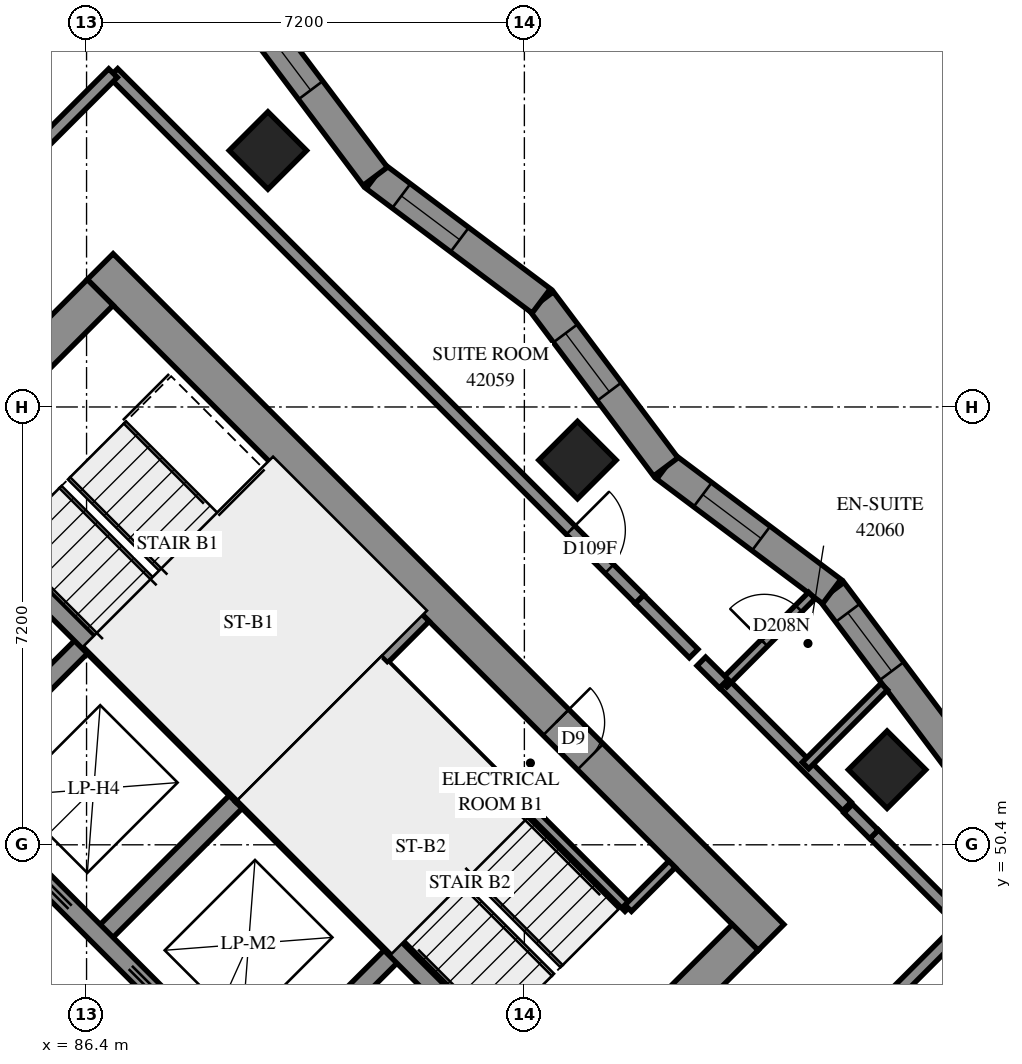
"""IFC4 building model, lengths in metres.
Left out: names, types, materials, properties, quantities, classifications, styles, units other than length and angle.
Written with IfcOpenShell. Run it as: python <this file> out.ifc"""

import sys

from ifc_helpers import new_model, si_unit, direction, frame, frame_2d, origin, origin_2d, place, context, subcontext, project, spatial, polyline, rectangle, outline, extrude, element, fill, save


model = new_model("IFC4")
c1 = context("Model", 3, precision=1e-05, world=origin(), true_north=direction((0.0, 1.0)))
c2 = subcontext(c1, "Body", "Model", "MODEL_VIEW")
j1 = project(units=[si_unit("LENGTHUNIT", "METRE"), si_unit("PLANEANGLEUNIT", "RADIAN")], contexts=[c1])
p1 = place(None, origin())
s1 = spatial("IfcSite", under=j1, at=p1, CompositionType="ELEMENT")
p2 = place(p1, origin())
s2 = spatial("IfcBuilding", under=s1, at=p2, CompositionType="ELEMENT")
p3 = place(p2, frame((0.0, 0.0, 155.8)))
s3 = spatial("IfcBuildingStorey", under=s2, at=p3, CompositionType="ELEMENT", Elevation=155.8)
for number, where, z_axis, x_axis in (
    (1, (89.382, 61.818, 0.0), (0.0, 0.0, 1.0), (0.707, -0.707, 0.0)),
    (2, (94.474, 56.727, 0.0), (0.0, 0.0, 1.0), (0.707, -0.707, 0.0)),
    (3, (99.565, 51.635, 0.0), (0.0, 0.0, 1.0), (0.707, -0.707, 0.0)),
):
    element("IfcColumn", number, at=place(p3, frame(where, z_axis=z_axis, x_axis=x_axis)), inside=s3, PredefinedType="COLUMN", context=c2, shape_type="SweptSolid", body=[
        extrude(rectangle(XDim=0.9, YDim=0.9, at=origin_2d()), origin(), (0.0, 0.0, 1.0), 3.1),
    ])
p4 = place(p3, frame((76.018, 49.302, -0.3), z_axis=(0.0, 0.0, 1.0), x_axis=(0.7071067812, -0.7071067812, 0.0)))
e4 = element("IfcWall", 4, at=p4, inside=s3, PredefinedType="SHEAR", context=c2, shape_type="SweptSolid", body=[
    extrude(rectangle(XDim=15.6, YDim=0.6, at=frame_2d((7.8, 0.0))), origin(), (0.0, 0.0, 1.0), 2.7),
])
p5 = place(p3, frame((86.625, 59.908, -0.3), z_axis=(0.0, 0.0, 1.0), x_axis=(0.7071067812, -0.7071067812, 0.0)))
e5 = element("IfcWall", 5, at=p5, inside=s3, PredefinedType="SHEAR", context=c2, shape_type="SweptSolid", body=[
    extrude(rectangle(XDim=15.6, YDim=0.6, at=frame_2d((7.8, 0.0))), origin(), (0.0, 0.0, 1.0), 2.7),
])
p6 = place(p5, frame((10.6, 0.0, 0.3)))
e6 = element("IfcOpeningElement", 6, at=p6, cuts=e5, PredefinedType="OPENING", context=c2, shape_type="SweptSolid", body=[
    extrude(rectangle(XDim=0.8, YDim=2.1, at=frame_2d((0.4, 1.05))), frame((0.0, 0.31, 0.0), z_axis=(0.0, -1.0, 0.0), x_axis=(1.0, 0.0, 0.0)), (0.0, 0.0, 1.0), 0.62),
])
p7 = place(p3, frame((76.442, 49.302, -0.3), z_axis=(0.0, 0.0, 1.0), x_axis=(0.7071067812, 0.7071067812, 0.0)))
e7 = element("IfcWall", 7, at=p7, inside=s3, PredefinedType="SHEAR", context=c2, shape_type="SweptSolid", body=[
    extrude(rectangle(XDim=14.4, YDim=0.6, at=frame_2d((7.2, 0.0))), origin(), (0.0, 0.0, 1.0), 2.7),
])
p8 = place(p7, frame((4.55, 0.0, 0.3)))
e8 = element("IfcOpeningElement", 8, at=p8, cuts=e7, PredefinedType="OPENING", context=c2, shape_type="SweptSolid", body=[
    extrude(rectangle(XDim=1.1, YDim=2.1, at=frame_2d((0.55, 1.05))), frame((0.0, 0.31, 0.0), z_axis=(0.0, -1.0, 0.0), x_axis=(1.0, 0.0, 0.0)), (0.0, 0.0, 1.0), 0.62),
])
p9 = place(p7, frame((11.35, 0.0, 0.3)))
e9 = element("IfcOpeningElement", 9, at=p9, cuts=e7, PredefinedType="OPENING", context=c2, shape_type="SweptSolid", body=[
    extrude(rectangle(XDim=1.1, YDim=2.1, at=frame_2d((0.55, 1.05))), frame((0.0, 0.31, 0.0), z_axis=(0.0, -1.0, 0.0), x_axis=(1.0, 0.0, 0.0)), (0.0, 0.0, 1.0), 0.62),
])
p10 = place(p3, frame((87.049, 38.695, -0.3), z_axis=(0.0, 0.0, 1.0), x_axis=(0.7071067812, 0.7071067812, 0.0)))
e10 = element("IfcWall", 10, at=p10, inside=s3, PredefinedType="SHEAR", context=c2, shape_type="SweptSolid", body=[
    extrude(rectangle(XDim=14.4, YDim=0.6, at=frame_2d((7.2, 0.0))), origin(), (0.0, 0.0, 1.0), 2.7),
])
p11 = place(p10, frame((4.55, 0.0, 0.3)))
e11 = element("IfcOpeningElement", 11, at=p11, cuts=e10, PredefinedType="OPENING", context=c2, shape_type="SweptSolid", body=[
    extrude(rectangle(XDim=1.1, YDim=2.1, at=frame_2d((0.55, 1.05))), frame((0.0, 0.31, 0.0), z_axis=(0.0, -1.0, 0.0), x_axis=(1.0, 0.0, 0.0)), (0.0, 0.0, 1.0), 0.62),
])
p12 = place(p10, frame((11.35, 0.0, 0.3)))
e12 = element("IfcOpeningElement", 12, at=p12, cuts=e10, PredefinedType="OPENING", context=c2, shape_type="SweptSolid", body=[
    extrude(rectangle(XDim=1.1, YDim=2.1, at=frame_2d((0.55, 1.05))), frame((0.0, 0.31, 0.0), z_axis=(0.0, -1.0, 0.0), x_axis=(1.0, 0.0, 0.0)), (0.0, 0.0, 1.0), 0.62),
])
p13 = place(p3, frame((84.079, 51.423, 0.0), z_axis=(0.0, 0.0, 1.0), x_axis=(0.7071219326, 0.7070916295, 0.0)))
e13 = element("IfcWall", 13, at=p13, inside=s3, PredefinedType="SOLIDWALL", context=c2, shape_type="SweptSolid", body=[
    extrude(rectangle(XDim=3.3, YDim=0.3, at=frame_2d((1.65, 0.0))), origin(), (0.0, 0.0, 1.0), 3.1),
])
for number, where, z_axis, x_axis in (
    (14, (86.625, 48.878, 0.0), (0.0, 0.0, 1.0), (0.707, 0.707, 0.0)),
    (15, (89.17, 46.332, 0.0), (0.0, 0.0, 1.0), (0.707, 0.707, 0.0)),
):
    element("IfcWall", number, at=place(p3, frame(where, z_axis=z_axis, x_axis=x_axis)), inside=s3, PredefinedType="SOLIDWALL", context=c2, shape_type="SweptSolid", body=[
        extrude(rectangle(XDim=3.3, YDim=0.3, at=frame_2d((1.65, 0.0))), origin(), (0.0, 0.0, 1.0), 3.1),
    ])
p14 = place(p3, frame((78.988, 51.423, 0.0), z_axis=(0.0, 0.0, 1.0), x_axis=(0.7071067812, -0.7071067812, 0.0)))
e16 = element("IfcWall", 16, at=p14, inside=s3, PredefinedType="SOLIDWALL", context=c2, shape_type="SweptSolid", body=[
    extrude(rectangle(XDim=14.4, YDim=0.3, at=frame_2d((7.2, 0.0))), origin(), (0.0, 0.0, 1.0), 3.1),
])
p15 = place(p14, frame((1.35, 0.0, 0.0)))
e17 = element("IfcOpeningElement", 17, at=p15, cuts=e16, PredefinedType="OPENING", context=c2, shape_type="SweptSolid", body=[
    extrude(rectangle(XDim=0.9, YDim=2.1, at=frame_2d((0.45, 1.05))), frame((0.0, 0.16, 0.0), z_axis=(0.0, -1.0, 0.0), x_axis=(1.0, 0.0, 0.0)), (0.0, 0.0, 1.0), 0.32),
])
p16 = place(p14, frame((4.95, 0.0, 0.0)))
e18 = element("IfcOpeningElement", 18, at=p16, cuts=e16, PredefinedType="OPENING", context=c2, shape_type="SweptSolid", body=[
    extrude(rectangle(XDim=0.9, YDim=2.1, at=frame_2d((0.45, 1.05))), frame((0.0, 0.16, 0.0), z_axis=(0.0, -1.0, 0.0), x_axis=(1.0, 0.0, 0.0)), (0.0, 0.0, 1.0), 0.32),
])
p17 = place(p14, frame((8.55, 0.0, 0.0)))
e19 = element("IfcOpeningElement", 19, at=p17, cuts=e16, PredefinedType="OPENING", context=c2, shape_type="SweptSolid", body=[
    extrude(rectangle(XDim=0.9, YDim=2.1, at=frame_2d((0.45, 1.05))), frame((0.0, 0.16, 0.0), z_axis=(0.0, -1.0, 0.0), x_axis=(1.0, 0.0, 0.0)), (0.0, 0.0, 1.0), 0.32),
])
p18 = place(p14, frame((12.05, 0.0, 0.0)))
e20 = element("IfcOpeningElement", 20, at=p18, cuts=e16, PredefinedType="OPENING", context=c2, shape_type="SweptSolid", body=[
    extrude(rectangle(XDim=1.1, YDim=2.1, at=frame_2d((0.55, 1.05))), frame((0.0, 0.16, 0.0), z_axis=(0.0, -1.0, 0.0), x_axis=(1.0, 0.0, 0.0)), (0.0, 0.0, 1.0), 0.32),
])
p19 = place(p3, frame((81.534, 53.969, 0.0), z_axis=(0.0, 0.0, 1.0), x_axis=(0.707103309, -0.7071102534, 0.0)))
e21 = element("IfcWall", 21, at=p19, inside=s3, PredefinedType="SOLIDWALL", context=c2, shape_type="SweptSolid", body=[
    extrude(rectangle(XDim=14.4, YDim=0.3, at=frame_2d((7.2, 0.0))), origin(), (0.0, 0.0, 1.0), 3.1),
])
p20 = place(p19, frame((1.25, 0.0, 0.0)))
e22 = element("IfcOpeningElement", 22, at=p20, cuts=e21, PredefinedType="OPENING", context=c2, shape_type="SweptSolid", body=[
    extrude(rectangle(XDim=1.1, YDim=2.1, at=frame_2d((0.55, 1.05))), frame((0.0, 0.16, 0.0), z_axis=(0.0, -1.0, 0.0), x_axis=(1.0, 0.0, 0.0)), (0.0, 0.0, 1.0), 0.32),
])
p21 = place(p19, frame((4.85, 0.0, 0.0)))
e23 = element("IfcOpeningElement", 23, at=p21, cuts=e21, PredefinedType="OPENING", context=c2, shape_type="SweptSolid", body=[
    extrude(rectangle(XDim=1.1, YDim=2.1, at=frame_2d((0.55, 1.05))), frame((0.0, 0.16, 0.0), z_axis=(0.0, -1.0, 0.0), x_axis=(1.0, 0.0, 0.0)), (0.0, 0.0, 1.0), 0.32),
])
p22 = place(p19, frame((8.45, 0.0, 0.0)))
e24 = element("IfcOpeningElement", 24, at=p22, cuts=e21, PredefinedType="OPENING", context=c2, shape_type="SweptSolid", body=[
    extrude(rectangle(XDim=1.1, YDim=2.1, at=frame_2d((0.55, 1.05))), frame((0.0, 0.16, 0.0), z_axis=(0.0, -1.0, 0.0), x_axis=(1.0, 0.0, 0.0)), (0.0, 0.0, 1.0), 0.32),
])
p23 = place(p19, frame((12.05, 0.0, 0.0)))
e25 = element("IfcOpeningElement", 25, at=p23, cuts=e21, PredefinedType="OPENING", context=c2, shape_type="SweptSolid", body=[
    extrude(rectangle(XDim=1.1, YDim=2.1, at=frame_2d((0.55, 1.05))), frame((0.0, 0.16, 0.0), z_axis=(0.0, -1.0, 0.0), x_axis=(1.0, 0.0, 0.0)), (0.0, 0.0, 1.0), 0.32),
])
for number, where, z_axis, x_axis in (
    (26, (83.867, 56.302, 0.0), (0.0, 0.0, 1.0), (0.707, -0.707, 0.0)),
    (27, (88.958, 51.211, 0.0), (0.0, 0.0, 1.0), (0.707, -0.707, 0.0)),
):
    element("IfcWall", number, at=place(p3, frame(where, z_axis=z_axis, x_axis=x_axis)), inside=s3, PredefinedType="SOLIDWALL", context=c2, shape_type="SweptSolid", body=[
        extrude(rectangle(XDim=7.2, YDim=0.3, at=frame_2d((3.6, 0.0))), origin(), (0.0, 0.0, 1.0), 3.1),
    ])
p24 = place(p3, frame((88.958, 51.211, 0.0), z_axis=(0.0, 0.0, 1.0), x_axis=(0.7071067812, 0.7071067812, 0.0)))
e28 = element("IfcWall", 28, at=p24, inside=s3, PredefinedType="SOLIDWALL", context=c2, shape_type="SweptSolid", body=[
    extrude(rectangle(XDim=4.2, YDim=0.3, at=frame_2d((2.1, 0.0))), origin(), (0.0, 0.0, 1.0), 3.1),
])
p25 = place(p3, frame((100.704, 51.836, 0.0), z_axis=(0.0, 0.0, 1.0), x_axis=(-0.600150005, 0.7998874743, 0.0)))
e29 = element("IfcWall", 29, at=p25, inside=s3, PredefinedType="SOLIDWALL", context=c2, shape_type="SweptSolid", body=[
    extrude(outline(polyline([(0.036, -0.25), (3.449, -0.25), (3.377, 0.25), (-0.036, 0.25), (0.036, -0.25)])), origin(), (0.0, 0.0, 1.0), 3.1),
])
p26 = place(p25, frame((1.774, 0.0, 0.45)))
e30 = element("IfcOpeningElement", 30, at=p26, cuts=e29, PredefinedType="OPENING", context=c2, shape_type="SweptSolid", body=[
    extrude(rectangle(XDim=1.2, YDim=2.5, at=frame_2d((0.6, 1.25))), frame((0.0, 0.26, 0.0), z_axis=(0.0, -1.0, 0.0), x_axis=(1.0, 0.0, 0.0)), (0.0, 0.0, 1.0), 0.52),
])
p27 = place(p3, frame((98.656, 54.566, 0.0), z_axis=(0.0, 0.0, 1.0), x_axis=(-0.7998874743, 0.600150005, 0.0)))
e31 = element("IfcWall", 31, at=p27, inside=s3, PredefinedType="SOLIDWALL", context=c2, shape_type="SweptSolid", body=[
    extrude(outline(polyline([(-0.036, -0.25), (3.377, -0.25), (3.449, 0.25), (0.036, 0.25), (-0.036, -0.25)])), origin(), (0.0, 0.0, 1.0), 3.1),
])
p28 = place(p27, frame((1.453, 0.0, 0.45)))
e32 = element("IfcOpeningElement", 32, at=p28, cuts=e31, PredefinedType="OPENING", context=c2, shape_type="SweptSolid", body=[
    extrude(rectangle(XDim=1.2, YDim=2.5, at=frame_2d((0.6, 1.25))), frame((0.0, 0.26, 0.0), z_axis=(0.0, -1.0, 0.0), x_axis=(1.0, 0.0, 0.0)), (0.0, 0.0, 1.0), 0.52),
])
p29 = place(p3, frame((95.926, 56.614, 0.0), z_axis=(0.0, 0.0, 1.0), x_axis=(-0.600150005, 0.7998874743, 0.0)))
e33 = element("IfcWall", 33, at=p29, inside=s3, PredefinedType="SOLIDWALL", context=c2, shape_type="SweptSolid", body=[
    extrude(outline(polyline([(0.036, -0.25), (3.449, -0.25), (3.377, 0.25), (-0.036, 0.25), (0.036, -0.25)])), origin(), (0.0, 0.0, 1.0), 3.1),
])
p30 = place(p29, frame((1.547, 0.0, 0.45)))
e34 = element("IfcOpeningElement", 34, at=p30, cuts=e33, PredefinedType="OPENING", context=c2, shape_type="SweptSolid", body=[
    extrude(rectangle(XDim=1.2, YDim=2.5, at=frame_2d((0.6, 1.25))), frame((0.0, 0.26, 0.0), z_axis=(0.0, -1.0, 0.0), x_axis=(1.0, 0.0, 0.0)), (0.0, 0.0, 1.0), 0.52),
])
p31 = place(p3, frame((93.877, 59.344, 0.0), z_axis=(0.0, 0.0, 1.0), x_axis=(-0.7998874743, 0.600150005, 0.0)))
e35 = element("IfcWall", 35, at=p31, inside=s3, PredefinedType="SOLIDWALL", context=c2, shape_type="SweptSolid", body=[
    extrude(outline(polyline([(-0.036, -0.25), (3.377, -0.25), (3.449, 0.25), (0.036, 0.25), (-0.036, -0.25)])), origin(), (0.0, 0.0, 1.0), 3.1),
])
p32 = place(p31, frame((1.677, 0.0, 0.45)))
e36 = element("IfcOpeningElement", 36, at=p32, cuts=e35, PredefinedType="OPENING", context=c2, shape_type="SweptSolid", body=[
    extrude(rectangle(XDim=1.2, YDim=2.5, at=frame_2d((0.6, 1.25))), frame((0.0, 0.26, 0.0), z_axis=(0.0, -1.0, 0.0), x_axis=(1.0, 0.0, 0.0)), (0.0, 0.0, 1.0), 0.52),
])
p33 = place(p3, frame((91.147, 61.393, 0.0), z_axis=(0.0, 0.0, 1.0), x_axis=(-0.600150005, 0.7998874743, 0.0)))
e37 = element("IfcWall", 37, at=p33, inside=s3, PredefinedType="SOLIDWALL", context=c2, shape_type="SweptSolid", body=[
    extrude(outline(polyline([(0.036, -0.25), (3.449, -0.25), (3.377, 0.25), (-0.036, 0.25), (0.036, -0.25)])), origin(), (0.0, 0.0, 1.0), 3.1),
])
p34 = place(p33, frame((1.771, 0.0, 0.45)))
e38 = element("IfcOpeningElement", 38, at=p34, cuts=e37, PredefinedType="OPENING", context=c2, shape_type="SweptSolid", body=[
    extrude(rectangle(XDim=1.2, YDim=2.5, at=frame_2d((0.6, 1.25))), frame((0.0, 0.26, 0.0), z_axis=(0.0, -1.0, 0.0), x_axis=(1.0, 0.0, 0.0)), (0.0, 0.0, 1.0), 0.52),
])
p35 = place(p3, frame((91.313, 53.354, 0.0), z_axis=(0.0, 0.0, 1.0), x_axis=(0.7071067812, -0.7071067812, 0.0)))
e39 = element("IfcWall", 39, at=p35, inside=s3, PredefinedType="PARTITIONING", context=c2, shape_type="SweptSolid", body=[
    extrude(rectangle(XDim=5.65, YDim=0.15, at=frame_2d((2.825, 0.0))), origin(), (0.0, 0.0, 1.0), 3.1),
])
p36 = place(p3, frame((95.308, 49.358, 0.0), z_axis=(0.0, 0.0, 1.0), x_axis=(0.70705776, 0.707155799, 0.0)))
e40 = element("IfcWall", 40, at=p36, inside=s3, PredefinedType="PARTITIONING", context=c2, shape_type="SweptSolid", body=[
    extrude(rectangle(XDim=1.02, YDim=0.15, at=frame_2d((0.51, 0.0))), origin(), (0.0, 0.0, 1.0), 3.1),
])
p37 = place(p3, frame((86.841, 63.093, 0.0), z_axis=(0.0, 0.0, 1.0), x_axis=(0.7071067812, -0.7071067812, 0.0)))
e41 = element("IfcWall", 41, at=p37, inside=s3, PredefinedType="PARTITIONING", context=c2, shape_type="SweptSolid", body=[
    extrude(rectangle(XDim=12.239, YDim=0.2, at=frame_2d((6.119, 0.0))), origin(), (0.0, 0.0, 1.0), 3.1),
])
p38 = place(p37, frame((10.634, 0.0, 0.0)))
e42 = element("IfcOpeningElement", 42, at=p38, cuts=e41, PredefinedType="OPENING", context=c2, shape_type="SweptSolid", body=[
    extrude(rectangle(XDim=0.9, YDim=2.1, at=frame_2d((0.45, 1.05))), frame((0.0, 0.11, 0.0), z_axis=(0.0, -1.0, 0.0), x_axis=(1.0, 0.0, 0.0)), (0.0, 0.0, 1.0), 0.22),
])
p39 = place(p3, frame((94.401, 41.383, 0.0), z_axis=(0.0, 0.0, 1.0), x_axis=(0.7071067812, 0.7071067812, 0.0)))
e43 = element("IfcWall", 43, at=p39, inside=s3, PredefinedType="PARTITIONING", context=c2, shape_type="SweptSolid", body=[
    extrude(rectangle(XDim=12.014, YDim=0.2, at=frame_2d((6.007, 0.0))), origin(), (0.0, 0.0, 1.0), 3.1),
])
p40 = place(p3, frame((93.767, 42.021, 0.0), z_axis=(0.0, 0.0, 1.0), x_axis=(0.7071067812, 0.7071067812, 0.0)))
e44 = element("IfcWall", 44, at=p40, inside=s3, PredefinedType="PARTITIONING", context=c2, shape_type="SweptSolid", body=[
    extrude(rectangle(XDim=9.998, YDim=0.2, at=frame_2d((4.999, 0.0))), origin(), (0.0, 0.0, 1.0), 3.1),
])
p41 = place(p40, frame((0.196, 0.0, 0.0)))
e45 = element("IfcOpeningElement", 45, at=p41, cuts=e44, PredefinedType="OPENING", context=c2, shape_type="SweptSolid", body=[
    extrude(rectangle(XDim=1.0, YDim=2.1, at=frame_2d((0.5, 1.05))), frame((0.0, 0.11, 0.0), z_axis=(0.0, -1.0, 0.0), x_axis=(1.0, 0.0, 0.0)), (0.0, 0.0, 1.0), 0.22),
])
p42 = place(p3, frame((79.799, 56.055, 0.0), z_axis=(0.0, 0.0, 1.0), x_axis=(0.7071067812, 0.7071067812, 0.0)))
e46 = element("IfcWall", 46, at=p42, inside=s3, PredefinedType="PARTITIONING", context=c2, shape_type="SweptSolid", body=[
    extrude(rectangle(XDim=9.95, YDim=0.2, at=frame_2d((4.975, 0.0))), origin(), (0.0, 0.0, 1.0), 3.1),
])
p43 = place(p42, frame((1.071, 0.0, 0.0)))
e47 = element("IfcOpeningElement", 47, at=p43, cuts=e46, PredefinedType="OPENING", context=c2, shape_type="SweptSolid", body=[
    extrude(rectangle(XDim=1.0, YDim=2.1, at=frame_2d((0.5, 1.05))), frame((0.0, 0.11, 0.0), z_axis=(0.0, -1.0, 0.0), x_axis=(1.0, 0.0, 0.0)), (0.0, 0.0, 1.0), 0.22),
])
p44 = place(p3, frame((96.882, 53.053, 0.0), z_axis=(0.0, 0.0, 1.0), x_axis=(0.7071067812, -0.7071067812, 0.0)))
e48 = element("IfcWall", 48, at=p44, inside=s3, PredefinedType="PARTITIONING", context=c2, shape_type="SweptSolid", body=[
    extrude(rectangle(XDim=2.86, YDim=0.2, at=frame_2d((1.43, 0.0))), origin(), (0.0, 0.0, 1.0), 3.1),
])
p45 = place(p3, frame((99.352, 50.574, 0.0), z_axis=(0.0, 0.0, 1.0), x_axis=(0.7075827869, -0.7066304548, 0.0)))
e49 = element("IfcWall", 49, at=p45, inside=s3, PredefinedType="PARTITIONING", context=c2, shape_type="SweptSolid", body=[
    extrude(rectangle(XDim=2.1, YDim=0.2, at=frame_2d((1.05, 0.0))), origin(), (0.0, 0.0, 1.0), 3.1),
])
p46 = place(p3, frame((96.877, 53.051, 0.0), z_axis=(0.0, 0.0, 1.0), x_axis=(0.707131173, 0.7070823885, 0.0)))
e50 = element("IfcWall", 50, at=p46, inside=s3, PredefinedType="PARTITIONING", context=c2, shape_type="SweptSolid", body=[
    extrude(rectangle(XDim=2.05, YDim=0.15, at=frame_2d((1.025, 0.0))), origin(), (0.0, 0.0, 1.0), 3.1),
])
p47 = place(p46, frame((0.946, 0.0, 0.0)))
e51 = element("IfcOpeningElement", 51, at=p47, cuts=e50, PredefinedType="OPENING", context=c2, shape_type="SweptSolid", body=[
    extrude(rectangle(XDim=0.8, YDim=2.1, at=frame_2d((0.4, 1.05))), frame((0.0, 0.085, 0.0), z_axis=(0.0, -1.0, 0.0), x_axis=(1.0, 0.0, 0.0)), (0.0, 0.0, 1.0), 0.17),
])
p48 = place(p3, frame((98.224, 51.704, 0.0), z_axis=(0.0, 0.0, 1.0), x_axis=(0.7065332413, 0.7076798563, 0.0)))
e52 = element("IfcWall", 52, at=p48, inside=s3, PredefinedType="PARTITIONING", context=c2, shape_type="SweptSolid", body=[
    extrude(rectangle(XDim=1.831, YDim=0.15, at=frame_2d((0.916, 0.0))), origin(), (0.0, 0.0, 1.0), 3.1),
])
p49 = place(p3, frame((95.494, 54.438, 0.0), z_axis=(0.0, 0.0, 1.0), x_axis=(0.706312726, -0.7078999456, 0.0)))
e53 = element("IfcWall", 53, at=p49, inside=s3, PredefinedType="PARTITIONING", context=c2, shape_type="SweptSolid", body=[
    extrude(rectangle(XDim=1.26, YDim=0.2, at=frame_2d((0.63, 0.0))), origin(), (0.0, 0.0, 1.0), 3.1),
])
p50 = place(p3, frame((98.925, 50.995, 0.0), z_axis=(0.0, 0.0, 1.0), x_axis=(0.7071067812, -0.7071067812, 0.0)))
e54 = element("IfcWall", 54, at=p50, inside=s3, PredefinedType="PARTITIONING", context=c2, shape_type="SweptSolid", body=[
    extrude(rectangle(XDim=0.6, YDim=0.2, at=frame_2d((0.3, 0.0))), origin(), (0.0, 0.0, 1.0), 3.1),
])
p51 = place(p3, frame((96.51, 53.416, 0.0), z_axis=(0.0, 0.0, 1.0), x_axis=(0.7090308706, -0.7051774419, 0.0)))
e55 = element("IfcWall", 55, at=p51, inside=s3, PredefinedType="PARTITIONING", context=c2, shape_type="SweptSolid", body=[
    extrude(rectangle(XDim=0.519, YDim=0.2, at=frame_2d((0.26, 0.0))), origin(), (0.0, 0.0, 1.0), 3.1),
])
p52 = place(p26, origin())
e56 = element("IfcWindow", 56, at=p52, inside=s3, PartitioningType="SINGLE_PANEL", PredefinedType="WINDOW", context=c2, shape_type="SweptSolid", body=[
    extrude(rectangle(XDim=1.2, YDim=2.5, at=frame_2d((0.6, 1.25))), frame((0.0, 0.18, 0.0), z_axis=(0.0, -1.0, 0.0), x_axis=(1.0, 0.0, 0.0)), (0.0, 0.0, 1.0), 0.06),
])
fill(e30, e56)
p53 = place(p28, origin())
e57 = element("IfcWindow", 57, at=p53, inside=s3, PartitioningType="SINGLE_PANEL", PredefinedType="WINDOW", context=c2, shape_type="SweptSolid", body=[
    extrude(rectangle(XDim=1.2, YDim=2.5, at=frame_2d((0.6, 1.25))), frame((0.0, 0.18, 0.0), z_axis=(0.0, -1.0, 0.0), x_axis=(1.0, 0.0, 0.0)), (0.0, 0.0, 1.0), 0.06),
])
fill(e32, e57)
p54 = place(p30, origin())
e58 = element("IfcWindow", 58, at=p54, inside=s3, PartitioningType="SINGLE_PANEL", PredefinedType="WINDOW", context=c2, shape_type="SweptSolid", body=[
    extrude(rectangle(XDim=1.2, YDim=2.5, at=frame_2d((0.6, 1.25))), frame((0.0, 0.18, 0.0), z_axis=(0.0, -1.0, 0.0), x_axis=(1.0, 0.0, 0.0)), (0.0, 0.0, 1.0), 0.06),
])
fill(e34, e58)
p55 = place(p32, origin())
e59 = element("IfcWindow", 59, at=p55, inside=s3, PartitioningType="SINGLE_PANEL", PredefinedType="WINDOW", context=c2, shape_type="SweptSolid", body=[
    extrude(rectangle(XDim=1.2, YDim=2.5, at=frame_2d((0.6, 1.25))), frame((0.0, 0.18, 0.0), z_axis=(0.0, -1.0, 0.0), x_axis=(1.0, 0.0, 0.0)), (0.0, 0.0, 1.0), 0.06),
])
fill(e36, e59)
p56 = place(p34, origin())
e60 = element("IfcWindow", 60, at=p56, inside=s3, PartitioningType="SINGLE_PANEL", PredefinedType="WINDOW", context=c2, shape_type="SweptSolid", body=[
    extrude(rectangle(XDim=1.2, YDim=2.5, at=frame_2d((0.6, 1.25))), frame((0.0, 0.18, 0.0), z_axis=(0.0, -1.0, 0.0), x_axis=(1.0, 0.0, 0.0)), (0.0, 0.0, 1.0), 0.06),
])
fill(e38, e60)
p57 = place(p6, origin())
e61 = element("IfcDoor", 61, at=p57, inside=s3, OperationType="SINGLE_SWING_RIGHT", PredefinedType="DOOR", context=c2, shape_type="SweptSolid", body=[
    extrude(rectangle(XDim=0.8, YDim=2.1, at=frame_2d((0.4, 1.05))), frame((0.0, 0.025, 0.0), z_axis=(0.0, -1.0, 0.0), x_axis=(1.0, 0.0, 0.0)), (0.0, 0.0, 1.0), 0.05),
])
fill(e6, e61)
p58 = place(p38, origin())
e62 = element("IfcDoor", 62, at=p58, inside=s3, OperationType="SINGLE_SWING_LEFT", PredefinedType="DOOR", context=c2, shape_type="SweptSolid", body=[
    extrude(rectangle(XDim=0.9, YDim=2.1, at=frame_2d((0.45, 1.05))), frame((0.0, 0.025, 0.0), z_axis=(0.0, -1.0, 0.0), x_axis=(1.0, 0.0, 0.0)), (0.0, 0.0, 1.0), 0.05),
])
fill(e42, e62)
p59 = place(p47, origin())
e63 = element("IfcDoor", 63, at=p59, inside=s3, OperationType="SINGLE_SWING_RIGHT", PredefinedType="DOOR", context=c2, shape_type="SweptSolid", body=[
    extrude(rectangle(XDim=0.8, YDim=2.1, at=frame_2d((0.4, 1.05))), frame((0.0, 0.025, 0.0), z_axis=(0.0, -1.0, 0.0), x_axis=(1.0, 0.0, 0.0)), (0.0, 0.0, 1.0), 0.05),
])
fill(e51, e63)
save(model, sys.argv[1])
